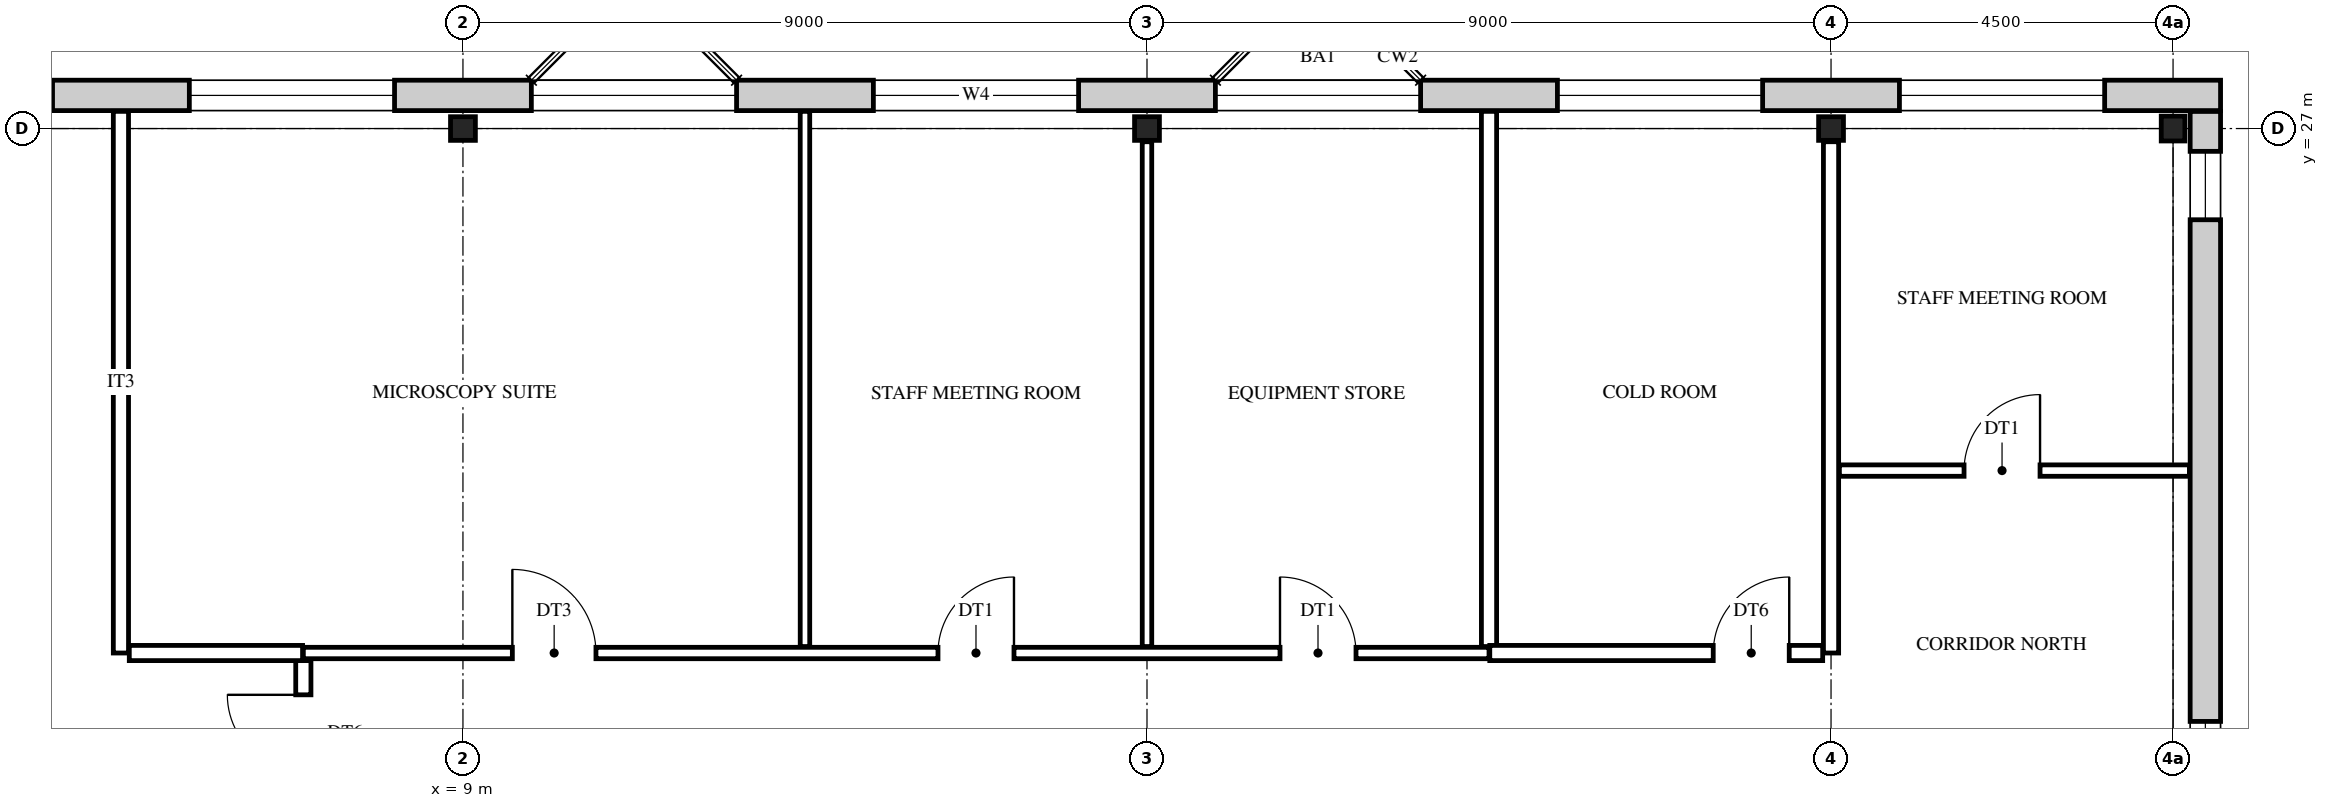
"""IFC4 building model, lengths in metres.
Left out: names, types, materials, properties, quantities, classifications, styles, units other than length and angle.
Written with IfcOpenShell. Run it as: python <this file> out.ifc"""

import sys

from ifc_helpers import new_model, si_unit, direction, frame, frame_2d, origin, origin_2d, place, context, subcontext, project, spatial, rectangle, i_section, extrude, element, fill, save


model = new_model("IFC4")
c1 = context("Model", 3, precision=1e-05, world=origin(), true_north=direction((0.0, 1.0)))
c2 = subcontext(c1, "Body", "Model", "MODEL_VIEW")
j1 = project(units=[si_unit("LENGTHUNIT", "METRE"), si_unit("PLANEANGLEUNIT", "RADIAN")], contexts=[c1])
p1 = place(None, origin())
s1 = spatial("IfcSite", under=j1, at=p1, CompositionType="ELEMENT")
p2 = place(p1, origin())
s2 = spatial("IfcBuilding", under=s1, at=p2, CompositionType="ELEMENT")
p3 = place(p2, frame((0.0, 0.0, 36.0)))
s3 = spatial("IfcBuildingStorey", under=s2, at=p3, CompositionType="ELEMENT", Elevation=36.0)
for number, where, z_axis, x_axis in (
    (1, (9.0, 27.0, 0.0), (0.0, 0.0, 1.0), (0.0, 1.0, 0.0)),
    (2, (18.0, 27.0, 0.0), (0.0, 0.0, 1.0), (0.0, 1.0, 0.0)),
    (3, (27.0, 27.0, 0.0), (0.0, 0.0, 1.0), (0.0, 1.0, 0.0)),
    (4, (31.5, 27.0, 0.0), (0.0, 0.0, 1.0), (1.0, 0.0, 0.0)),
):
    element("IfcColumn", number, at=place(p3, frame(where, z_axis=z_axis, x_axis=x_axis)), inside=s3, PredefinedType="COLUMN", context=c2, shape_type="SweptSolid", body=[
        extrude(i_section(OverallWidth=0.311, OverallDepth=0.327, WebThickness=0.016, FlangeThickness=0.025, FilletRadius=0.017, at=origin_2d()), origin(), (0.0, 0.0, 1.0), 4.2),
    ])
p4 = place(p3, frame((-0.625, 27.436, 0.0), z_axis=(0.0, 0.0, 1.0), x_axis=(1.0, 0.0, 0.0)))
e5 = element("IfcWall", 5, at=p4, inside=s3, PredefinedType="STANDARD", context=c2, shape_type="SweptSolid", body=[
    extrude(rectangle(XDim=32.75, YDim=0.4, at=frame_2d((16.375, 0.0))), origin(), (0.0, 0.0, 1.0), 4.2),
])
p5 = place(p4, frame((1.525, 0.0, 0.9)))
e6 = element("IfcOpeningElement", 6, at=p5, cuts=e5, PredefinedType="OPENING", context=c2, shape_type="SweptSolid", body=[
    extrude(rectangle(XDim=2.7, YDim=2.5, at=frame_2d((1.35, 1.25))), frame((0.0, 0.21, 0.0), z_axis=(0.0, -1.0, 0.0), x_axis=(1.0, 0.0, 0.0)), (0.0, 0.0, 1.0), 0.42),
])
p6 = place(p4, frame((6.025, 0.0, 0.9)))
e7 = element("IfcOpeningElement", 7, at=p6, cuts=e5, PredefinedType="OPENING", context=c2, shape_type="SweptSolid", body=[
    extrude(rectangle(XDim=2.7, YDim=2.5, at=frame_2d((1.35, 1.25))), frame((0.0, 0.21, 0.0), z_axis=(0.0, -1.0, 0.0), x_axis=(1.0, 0.0, 0.0)), (0.0, 0.0, 1.0), 0.42),
])
p7 = place(p4, frame((10.525, 0.0, 0.9)))
e8 = element("IfcOpeningElement", 8, at=p7, cuts=e5, PredefinedType="OPENING", context=c2, shape_type="SweptSolid", body=[
    extrude(rectangle(XDim=2.7, YDim=2.5, at=frame_2d((1.35, 1.25))), frame((0.0, 0.21, 0.0), z_axis=(0.0, -1.0, 0.0), x_axis=(1.0, 0.0, 0.0)), (0.0, 0.0, 1.0), 0.42),
])
p8 = place(p4, frame((15.025, 0.0, 0.9)))
e9 = element("IfcOpeningElement", 9, at=p8, cuts=e5, PredefinedType="OPENING", context=c2, shape_type="SweptSolid", body=[
    extrude(rectangle(XDim=2.7, YDim=2.5, at=frame_2d((1.35, 1.25))), frame((0.0, 0.21, 0.0), z_axis=(0.0, -1.0, 0.0), x_axis=(1.0, 0.0, 0.0)), (0.0, 0.0, 1.0), 0.42),
])
p9 = place(p4, frame((19.525, 0.0, 0.9)))
e10 = element("IfcOpeningElement", 10, at=p9, cuts=e5, PredefinedType="OPENING", context=c2, shape_type="SweptSolid", body=[
    extrude(rectangle(XDim=2.7, YDim=2.5, at=frame_2d((1.35, 1.25))), frame((0.0, 0.21, 0.0), z_axis=(0.0, -1.0, 0.0), x_axis=(1.0, 0.0, 0.0)), (0.0, 0.0, 1.0), 0.42),
])
p10 = place(p4, frame((24.025, 0.0, 0.9)))
e11 = element("IfcOpeningElement", 11, at=p10, cuts=e5, PredefinedType="OPENING", context=c2, shape_type="SweptSolid", body=[
    extrude(rectangle(XDim=2.7, YDim=2.5, at=frame_2d((1.35, 1.25))), frame((0.0, 0.21, 0.0), z_axis=(0.0, -1.0, 0.0), x_axis=(1.0, 0.0, 0.0)), (0.0, 0.0, 1.0), 0.42),
])
p11 = place(p4, frame((28.525, 0.0, 0.9)))
e12 = element("IfcOpeningElement", 12, at=p11, cuts=e5, PredefinedType="OPENING", context=c2, shape_type="SweptSolid", body=[
    extrude(rectangle(XDim=2.7, YDim=2.5, at=frame_2d((1.35, 1.25))), frame((0.0, 0.21, 0.0), z_axis=(0.0, -1.0, 0.0), x_axis=(1.0, 0.0, 0.0)), (0.0, 0.0, 1.0), 0.42),
])
p12 = place(p3, frame((31.925, 27.225, 0.0), z_axis=(0.0, 0.0, 1.0), x_axis=(0.0, -1.0, 0.0)))
e13 = element("IfcWall", 13, at=p12, inside=s3, PredefinedType="STANDARD", context=c2, shape_type="SweptSolid", body=[
    extrude(rectangle(XDim=27.45, YDim=0.4, at=frame_2d((13.725, 0.0))), origin(), (0.0, 0.0, 1.0), 4.2),
])
p13 = place(p12, frame((26.025, 0.0, 0.9)))
e14 = element("IfcOpeningElement", 14, at=p13, cuts=e13, PredefinedType="OPENING", context=c2, shape_type="SweptSolid", body=[
    extrude(rectangle(XDim=0.9, YDim=2.0, at=frame_2d((0.45, 1.0))), frame((0.0, 0.21, 0.0), z_axis=(0.0, -1.0, 0.0), x_axis=(1.0, 0.0, 0.0)), (0.0, 0.0, 1.0), 0.42),
])
p14 = place(p12, frame((18.525, 0.0, 0.9)))
e15 = element("IfcOpeningElement", 15, at=p14, cuts=e13, PredefinedType="OPENING", context=c2, shape_type="SweptSolid", body=[
    extrude(rectangle(XDim=0.9, YDim=2.0, at=frame_2d((0.45, 1.0))), frame((0.0, 0.21, 0.0), z_axis=(0.0, -1.0, 0.0), x_axis=(1.0, 0.0, 0.0)), (0.0, 0.0, 1.0), 0.42),
])
p15 = place(p12, frame((15.675, 0.0, 1.6)))
e16 = element("IfcOpeningElement", 16, at=p15, cuts=e13, PredefinedType="OPENING", context=c2, shape_type="SweptSolid", body=[
    extrude(rectangle(XDim=0.6, YDim=0.9, at=frame_2d((0.3, 0.45))), frame((0.0, 0.21, 0.0), z_axis=(0.0, -1.0, 0.0), x_axis=(1.0, 0.0, 0.0)), (0.0, 0.0, 1.0), 0.42),
])
p16 = place(p12, frame((11.175, 0.0, 1.6)))
e17 = element("IfcOpeningElement", 17, at=p16, cuts=e13, PredefinedType="OPENING", context=c2, shape_type="SweptSolid", body=[
    extrude(rectangle(XDim=0.6, YDim=0.9, at=frame_2d((0.3, 0.45))), frame((0.0, 0.21, 0.0), z_axis=(0.0, -1.0, 0.0), x_axis=(1.0, 0.0, 0.0)), (0.0, 0.0, 1.0), 0.42),
])
p17 = place(p12, frame((8.025, 0.0, 0.9)))
e18 = element("IfcOpeningElement", 18, at=p17, cuts=e13, PredefinedType="OPENING", context=c2, shape_type="SweptSolid", body=[
    extrude(rectangle(XDim=0.9, YDim=2.0, at=frame_2d((0.45, 1.0))), frame((0.0, 0.21, 0.0), z_axis=(0.0, -1.0, 0.0), x_axis=(1.0, 0.0, 0.0)), (0.0, 0.0, 1.0), 0.42),
])
p18 = place(p12, frame((0.525, 0.0, 0.9)))
e19 = element("IfcOpeningElement", 19, at=p18, cuts=e13, PredefinedType="OPENING", context=c2, shape_type="SweptSolid", body=[
    extrude(rectangle(XDim=0.9, YDim=2.0, at=frame_2d((0.45, 1.0))), frame((0.0, 0.21, 0.0), z_axis=(0.0, -1.0, 0.0), x_axis=(1.0, 0.0, 0.0)), (0.0, 0.0, 1.0), 0.42),
])
p19 = place(p3, frame((4.5, 20.1, 0.0), z_axis=(0.0, 0.0, 1.0), x_axis=(0.0, 1.0, 0.0)))
e20 = element("IfcWall", 20, at=p19, inside=s3, PredefinedType="PARTITIONING", context=c2, shape_type="SweptSolid", body=[
    extrude(rectangle(XDim=7.126, YDim=0.2, at=frame_2d((3.563, 0.0))), origin(), (0.0, 0.0, 1.0), 3.537),
])
p20 = place(p3, frame((6.9, 18.01, 0.0), z_axis=(0.0, 0.0, 1.0), x_axis=(0.0, 1.0, 0.0)))
e21 = element("IfcWall", 21, at=p20, inside=s3, PredefinedType="PARTITIONING", context=c2, shape_type="SweptSolid", body=[
    extrude(rectangle(XDim=1.99, YDim=0.2, at=frame_2d((0.995, 0.0))), origin(), (0.0, 0.0, 1.0), 3.537),
])
p21 = place(p20, frame((0.54, 0.0, 0.0)))
e22 = element("IfcOpeningElement", 22, at=p21, cuts=e21, PredefinedType="OPENING", context=c2, shape_type="SweptSolid", body=[
    extrude(rectangle(XDim=1.0, YDim=2.1, at=frame_2d((0.5, 1.05))), frame((0.0, 0.11, 0.0), z_axis=(0.0, -1.0, 0.0), x_axis=(1.0, 0.0, 0.0)), (0.0, 0.0, 1.0), 0.22),
])
p22 = place(p3, frame((13.5, 20.185, 0.0), z_axis=(0.0, 0.0, 1.0), x_axis=(0.0, 1.0, 0.0)))
e23 = element("IfcWall", 23, at=p22, inside=s3, PredefinedType="PARTITIONING", context=c2, shape_type="SweptSolid", body=[
    extrude(rectangle(XDim=7.041, YDim=0.125, at=frame_2d((3.521, 0.0))), origin(), (0.0, 0.0, 1.0), 3.537),
])
p23 = place(p3, frame((18.0, 20.185, 0.0), z_axis=(0.0, 0.0, 1.0), x_axis=(0.0, 1.0, 0.0)))
e24 = element("IfcWall", 24, at=p23, inside=s3, PredefinedType="PARTITIONING", context=c2, shape_type="SweptSolid", body=[
    extrude(rectangle(XDim=6.641, YDim=0.125, at=frame_2d((3.321, 0.0))), origin(), (0.0, 0.0, 1.0), 3.537),
])
p24 = place(p3, frame((22.5, 20.185, 0.0), z_axis=(0.0, 0.0, 1.0), x_axis=(0.0, 1.0, 0.0)))
e25 = element("IfcWall", 25, at=p24, inside=s3, PredefinedType="PARTITIONING", context=c2, shape_type="SweptSolid", body=[
    extrude(rectangle(XDim=7.041, YDim=0.2, at=frame_2d((3.521, 0.0))), origin(), (0.0, 0.0, 1.0), 3.537),
])
p25 = place(p3, frame((27.0, 20.1, 0.0), z_axis=(0.0, 0.0, 1.0), x_axis=(0.0, 1.0, 0.0)))
e26 = element("IfcWall", 26, at=p25, inside=s3, PredefinedType="PARTITIONING", context=c2, shape_type="SweptSolid", body=[
    extrude(rectangle(XDim=6.726, YDim=0.2, at=frame_2d((3.363, 0.0))), origin(), (0.0, 0.0, 1.0), 3.537),
])
p26 = place(p3, frame((4.61, 20.1, 0.0), z_axis=(0.0, 0.0, 1.0), x_axis=(1.0, 0.0, 0.0)))
e27 = element("IfcWall", 27, at=p26, inside=s3, PredefinedType="PARTITIONING", context=c2, shape_type="SweptSolid", body=[
    extrude(rectangle(XDim=2.28, YDim=0.2, at=frame_2d((1.14, 0.0))), origin(), (0.0, 0.0, 1.0), 3.537),
])
p27 = place(p3, frame((6.9, 20.1, 0.0), z_axis=(0.0, 0.0, 1.0), x_axis=(1.0, 0.0, 0.0)))
e28 = element("IfcWall", 28, at=p27, inside=s3, PredefinedType="PARTITIONING", context=c2, shape_type="SweptSolid", body=[
    extrude(rectangle(XDim=15.6, YDim=0.15, at=frame_2d((7.8, 0.0))), origin(), (0.0, 0.0, 1.0), 3.537),
])
p28 = place(p27, frame((2.75, 0.0, 0.0)))
e29 = element("IfcOpeningElement", 29, at=p28, cuts=e28, PredefinedType="OPENING", context=c2, shape_type="SweptSolid", body=[
    extrude(rectangle(XDim=1.1, YDim=2.1, at=frame_2d((0.55, 1.05))), frame((0.0, 0.085, 0.0), z_axis=(0.0, -1.0, 0.0), x_axis=(1.0, 0.0, 0.0)), (0.0, 0.0, 1.0), 0.17),
])
p29 = place(p27, frame((8.35, 0.0, 0.0)))
e30 = element("IfcOpeningElement", 30, at=p29, cuts=e28, PredefinedType="OPENING", context=c2, shape_type="SweptSolid", body=[
    extrude(rectangle(XDim=1.0, YDim=2.1, at=frame_2d((0.5, 1.05))), frame((0.0, 0.085, 0.0), z_axis=(0.0, -1.0, 0.0), x_axis=(1.0, 0.0, 0.0)), (0.0, 0.0, 1.0), 0.17),
])
p30 = place(p27, frame((12.85, 0.0, 0.0)))
e31 = element("IfcOpeningElement", 31, at=p30, cuts=e28, PredefinedType="OPENING", context=c2, shape_type="SweptSolid", body=[
    extrude(rectangle(XDim=1.0, YDim=2.1, at=frame_2d((0.5, 1.05))), frame((0.0, 0.085, 0.0), z_axis=(0.0, -1.0, 0.0), x_axis=(1.0, 0.0, 0.0)), (0.0, 0.0, 1.0), 0.17),
])
p31 = place(p3, frame((22.51, 20.1, 0.0), z_axis=(0.0, 0.0, 1.0), x_axis=(1.0, 0.0, 0.0)))
e32 = element("IfcWall", 32, at=p31, inside=s3, PredefinedType="PARTITIONING", context=c2, shape_type="SweptSolid", body=[
    extrude(rectangle(XDim=4.38, YDim=0.2, at=frame_2d((2.19, 0.0))), origin(), (0.0, 0.0, 1.0), 3.537),
])
p32 = place(p31, frame((2.94, 0.0, 0.0)))
e33 = element("IfcOpeningElement", 33, at=p32, cuts=e32, PredefinedType="OPENING", context=c2, shape_type="SweptSolid", body=[
    extrude(rectangle(XDim=1.0, YDim=2.1, at=frame_2d((0.5, 1.05))), frame((0.0, 0.11, 0.0), z_axis=(0.0, -1.0, 0.0), x_axis=(1.0, 0.0, 0.0)), (0.0, 0.0, 1.0), 0.22),
])
p33 = place(p3, frame((27.11, 22.5, 0.0), z_axis=(0.0, 0.0, 1.0), x_axis=(1.0, 0.0, 0.0)))
e34 = element("IfcWall", 34, at=p33, inside=s3, PredefinedType="PARTITIONING", context=c2, shape_type="SweptSolid", body=[
    extrude(rectangle(XDim=4.605, YDim=0.15, at=frame_2d((2.302, 0.0))), origin(), (0.0, 0.0, 1.0), 3.537),
])
p34 = place(p33, frame((1.64, 0.0, 0.0)))
e35 = element("IfcOpeningElement", 35, at=p34, cuts=e34, PredefinedType="OPENING", context=c2, shape_type="SweptSolid", body=[
    extrude(rectangle(XDim=1.0, YDim=2.1, at=frame_2d((0.5, 1.05))), frame((0.0, 0.085, 0.0), z_axis=(0.0, -1.0, 0.0), x_axis=(1.0, 0.0, 0.0)), (0.0, 0.0, 1.0), 0.17),
])
p35 = place(p6, origin())
e36 = element("IfcWindow", 36, at=p35, inside=s3, PartitioningType="SINGLE_PANEL", PredefinedType="WINDOW", context=c2, shape_type="SweptSolid", body=[
    extrude(rectangle(XDim=2.7, YDim=2.5, at=frame_2d((1.35, 1.25))), frame((0.0, 0.03, 0.0), z_axis=(0.0, -1.0, 0.0), x_axis=(1.0, 0.0, 0.0)), (0.0, 0.0, 1.0), 0.06),
])
fill(e7, e36)
p36 = place(p7, origin())
e37 = element("IfcWindow", 37, at=p36, inside=s3, PartitioningType="SINGLE_PANEL", PredefinedType="WINDOW", context=c2, shape_type="SweptSolid", body=[
    extrude(rectangle(XDim=2.7, YDim=2.5, at=frame_2d((1.35, 1.25))), frame((0.0, 0.03, 0.0), z_axis=(0.0, -1.0, 0.0), x_axis=(1.0, 0.0, 0.0)), (0.0, 0.0, 1.0), 0.06),
])
fill(e8, e37)
p37 = place(p8, origin())
e38 = element("IfcWindow", 38, at=p37, inside=s3, PartitioningType="SINGLE_PANEL", PredefinedType="WINDOW", context=c2, shape_type="SweptSolid", body=[
    extrude(rectangle(XDim=2.7, YDim=2.5, at=frame_2d((1.35, 1.25))), frame((0.0, 0.03, 0.0), z_axis=(0.0, -1.0, 0.0), x_axis=(1.0, 0.0, 0.0)), (0.0, 0.0, 1.0), 0.06),
])
fill(e9, e38)
p38 = place(p9, origin())
e39 = element("IfcWindow", 39, at=p38, inside=s3, PartitioningType="SINGLE_PANEL", PredefinedType="WINDOW", context=c2, shape_type="SweptSolid", body=[
    extrude(rectangle(XDim=2.7, YDim=2.5, at=frame_2d((1.35, 1.25))), frame((0.0, 0.03, 0.0), z_axis=(0.0, -1.0, 0.0), x_axis=(1.0, 0.0, 0.0)), (0.0, 0.0, 1.0), 0.06),
])
fill(e10, e39)
p39 = place(p10, origin())
e40 = element("IfcWindow", 40, at=p39, inside=s3, PartitioningType="SINGLE_PANEL", PredefinedType="WINDOW", context=c2, shape_type="SweptSolid", body=[
    extrude(rectangle(XDim=2.7, YDim=2.5, at=frame_2d((1.35, 1.25))), frame((0.0, 0.03, 0.0), z_axis=(0.0, -1.0, 0.0), x_axis=(1.0, 0.0, 0.0)), (0.0, 0.0, 1.0), 0.06),
])
fill(e11, e40)
p40 = place(p11, origin())
e41 = element("IfcWindow", 41, at=p40, inside=s3, PartitioningType="SINGLE_PANEL", PredefinedType="WINDOW", context=c2, shape_type="SweptSolid", body=[
    extrude(rectangle(XDim=2.7, YDim=2.5, at=frame_2d((1.35, 1.25))), frame((0.0, 0.03, 0.0), z_axis=(0.0, -1.0, 0.0), x_axis=(1.0, 0.0, 0.0)), (0.0, 0.0, 1.0), 0.06),
])
fill(e12, e41)
p41 = place(p17, origin())
e42 = element("IfcWindow", 42, at=p41, inside=s3, PartitioningType="SINGLE_PANEL", PredefinedType="WINDOW", context=c2, shape_type="SweptSolid", body=[
    extrude(rectangle(XDim=0.9, YDim=2.0, at=frame_2d((0.45, 1.0))), frame((0.0, 0.03, 0.0), z_axis=(0.0, -1.0, 0.0), x_axis=(1.0, 0.0, 0.0)), (0.0, 0.0, 1.0), 0.06),
])
fill(e18, e42)
p42 = place(p18, origin())
e43 = element("IfcWindow", 43, at=p42, inside=s3, PartitioningType="SINGLE_PANEL", PredefinedType="WINDOW", context=c2, shape_type="SweptSolid", body=[
    extrude(rectangle(XDim=0.9, YDim=2.0, at=frame_2d((0.45, 1.0))), frame((0.0, 0.03, 0.0), z_axis=(0.0, -1.0, 0.0), x_axis=(1.0, 0.0, 0.0)), (0.0, 0.0, 1.0), 0.06),
])
fill(e19, e43)
p43 = place(p21, origin())
e44 = element("IfcDoor", 44, at=p43, inside=s3, OperationType="SINGLE_SWING_RIGHT", PredefinedType="DOOR", context=c2, shape_type="SweptSolid", body=[
    extrude(rectangle(XDim=1.0, YDim=2.1, at=frame_2d((0.5, 1.05))), frame((0.0, 0.025, 0.0), z_axis=(0.0, -1.0, 0.0), x_axis=(1.0, 0.0, 0.0)), (0.0, 0.0, 1.0), 0.05),
])
fill(e22, e44)
p44 = place(p28, origin())
e45 = element("IfcDoor", 45, at=p44, inside=s3, OperationType="SINGLE_SWING_LEFT", PredefinedType="DOOR", context=c2, shape_type="SweptSolid", body=[
    extrude(rectangle(XDim=1.1, YDim=2.1, at=frame_2d((0.55, 1.05))), frame((0.0, 0.025, 0.0), z_axis=(0.0, -1.0, 0.0), x_axis=(1.0, 0.0, 0.0)), (0.0, 0.0, 1.0), 0.05),
])
fill(e29, e45)
p45 = place(p29, origin())
e46 = element("IfcDoor", 46, at=p45, inside=s3, OperationType="SINGLE_SWING_RIGHT", PredefinedType="DOOR", context=c2, shape_type="SweptSolid", body=[
    extrude(rectangle(XDim=1.0, YDim=2.1, at=frame_2d((0.5, 1.05))), frame((0.0, 0.025, 0.0), z_axis=(0.0, -1.0, 0.0), x_axis=(1.0, 0.0, 0.0)), (0.0, 0.0, 1.0), 0.05),
])
fill(e30, e46)
p46 = place(p30, origin())
e47 = element("IfcDoor", 47, at=p46, inside=s3, OperationType="SINGLE_SWING_LEFT", PredefinedType="DOOR", context=c2, shape_type="SweptSolid", body=[
    extrude(rectangle(XDim=1.0, YDim=2.1, at=frame_2d((0.5, 1.05))), frame((0.0, 0.025, 0.0), z_axis=(0.0, -1.0, 0.0), x_axis=(1.0, 0.0, 0.0)), (0.0, 0.0, 1.0), 0.05),
])
fill(e31, e47)
p47 = place(p32, origin())
e48 = element("IfcDoor", 48, at=p47, inside=s3, OperationType="SINGLE_SWING_RIGHT", PredefinedType="DOOR", context=c2, shape_type="SweptSolid", body=[
    extrude(rectangle(XDim=1.0, YDim=2.1, at=frame_2d((0.5, 1.05))), frame((0.0, 0.025, 0.0), z_axis=(0.0, -1.0, 0.0), x_axis=(1.0, 0.0, 0.0)), (0.0, 0.0, 1.0), 0.05),
])
fill(e33, e48)
p48 = place(p34, origin())
e49 = element("IfcDoor", 49, at=p48, inside=s3, OperationType="SINGLE_SWING_RIGHT", PredefinedType="DOOR", context=c2, shape_type="SweptSolid", body=[
    extrude(rectangle(XDim=1.0, YDim=2.1, at=frame_2d((0.5, 1.05))), frame((0.0, 0.025, 0.0), z_axis=(0.0, -1.0, 0.0), x_axis=(1.0, 0.0, 0.0)), (0.0, 0.0, 1.0), 0.05),
])
fill(e35, e49)
save(model, sys.argv[1])
